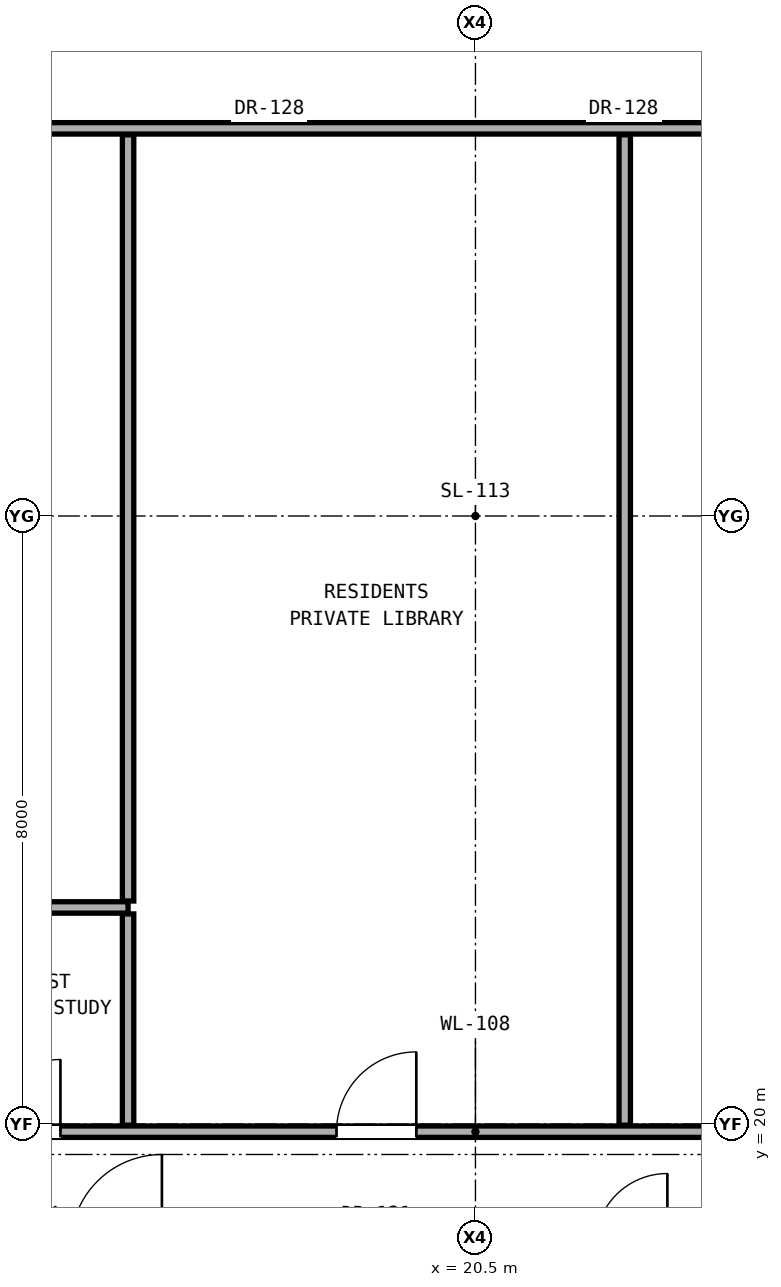
"""IFC4 building model, lengths in metres.
Left out: names, types, materials, properties, quantities, classifications, styles, units other than length and angle.
Written with IfcOpenShell. Run it as: python <this file> out.ifc"""

import sys

from ifc_helpers import new_model, si_unit, direction, frame, frame_2d, origin, place, context, subcontext, project, spatial, rectangle, extrude, element, fill, save


model = new_model("IFC4")
c1 = context("Model", 3, precision=1e-05, world=origin(), true_north=direction((0.0, 1.0)))
c2 = subcontext(c1, "Body", "Model", "MODEL_VIEW")
j1 = project(units=[si_unit("LENGTHUNIT", "METRE"), si_unit("PLANEANGLEUNIT", "RADIAN")], contexts=[c1])
p1 = place(None, origin())
s1 = spatial("IfcSite", under=j1, at=p1, CompositionType="ELEMENT")
p2 = place(p1, origin())
s2 = spatial("IfcBuilding", under=s1, at=p2, CompositionType="ELEMENT")
p3 = place(p2, frame((0.0, 0.0, 219.4)))
s3 = spatial("IfcBuildingStorey", under=s2, at=p3, CompositionType="ELEMENT", Elevation=219.4)
p4 = place(p3, frame((10.22, 19.9, 0.0), z_axis=(0.0, 0.0, 1.0), x_axis=(1.0, 0.0, 0.0)))
e1 = element("IfcWall", 1, at=p4, inside=s3, PredefinedType="PARTITIONING", context=c2, shape_type="SweptSolid", body=[
    extrude(rectangle(XDim=20.56, YDim=0.15, at=frame_2d((10.28, 0.0))), origin(), (0.0, 0.0, 1.0), 2.236),
])
p5 = place(p4, frame((1.36, 0.0, 0.0)))
e2 = element("IfcOpeningElement", 2, at=p5, cuts=e1, PredefinedType="OPENING", context=c2, shape_type="SweptSolid", body=[
    extrude(rectangle(XDim=0.9, YDim=2.1, at=frame_2d((0.45, 1.05))), frame((0.0, 0.085, 0.0), z_axis=(0.0, -1.0, 0.0), x_axis=(1.0, 0.0, 0.0)), (0.0, 0.0, 1.0), 0.17),
])
p6 = place(p4, frame((3.87, 0.0, 0.0)))
e3 = element("IfcOpeningElement", 3, at=p6, cuts=e1, PredefinedType="OPENING", context=c2, shape_type="SweptSolid", body=[
    extrude(rectangle(XDim=0.95, YDim=2.15, at=frame_2d((0.475, 1.075))), frame((0.0, 0.085, 0.0), z_axis=(0.0, -1.0, 0.0), x_axis=(1.0, 0.0, 0.0)), (0.0, 0.0, 1.0), 0.17),
])
p7 = place(p4, frame((8.452, 0.0, 0.0)))
e4 = element("IfcOpeningElement", 4, at=p7, cuts=e1, PredefinedType="OPENING", context=c2, shape_type="SweptSolid", body=[
    extrude(rectangle(XDim=1.05, YDim=2.2, at=frame_2d((0.525, 1.1))), frame((0.0, 0.085, 0.0), z_axis=(0.0, -1.0, 0.0), x_axis=(1.0, 0.0, 0.0)), (0.0, 0.0, 1.0), 0.17),
])
p8 = place(p3, frame((10.22, 22.85, 0.0), z_axis=(0.0, 0.0, 1.0), x_axis=(1.0, 0.0, 0.0)))
e5 = element("IfcWall", 5, at=p8, inside=s3, PredefinedType="PARTITIONING", context=c2, shape_type="SweptSolid", body=[
    extrude(rectangle(XDim=5.71, YDim=0.15, at=frame_2d((2.855, 0.0))), origin(), (0.0, 0.0, 1.0), 2.236),
])
p9 = place(p3, frame((10.22, 33.1, 0.0), z_axis=(0.0, 0.0, 1.0), x_axis=(1.0, 0.0, 0.0)))
e6 = element("IfcWall", 6, at=p9, inside=s3, PredefinedType="PARTITIONING", context=c2, shape_type="SweptSolid", body=[
    extrude(rectangle(XDim=20.56, YDim=0.15, at=frame_2d((10.28, 0.0))), origin(), (0.0, 0.0, 1.0), 2.236),
])
p10 = place(p9, frame((15.857, 0.0, 0.0)))
e7 = element("IfcOpeningElement", 7, at=p10, cuts=e6, PredefinedType="OPENING", context=c2, shape_type="SweptSolid", body=[
    extrude(rectangle(XDim=1.05, YDim=2.2, at=frame_2d((0.525, 1.1))), frame((0.0, 0.085, 0.0), z_axis=(0.0, -1.0, 0.0), x_axis=(1.0, 0.0, 0.0)), (0.0, 0.0, 1.0), 0.17),
])
p11 = place(p3, frame((15.93, 19.985, 0.0), z_axis=(0.0, 0.0, 1.0), x_axis=(0.0, 1.0, 0.0)))
e8 = element("IfcWall", 8, at=p11, inside=s3, PredefinedType="PARTITIONING", context=c2, shape_type="SweptSolid", body=[
    extrude(rectangle(XDim=2.78, YDim=0.15, at=frame_2d((1.39, 0.0))), origin(), (0.0, 0.0, 1.0), 3.1),
])
p12 = place(p3, frame((15.93, 22.935, 0.0), z_axis=(0.0, 0.0, 1.0), x_axis=(0.0, 1.0, 0.0)))
e9 = element("IfcWall", 9, at=p12, inside=s3, PredefinedType="PARTITIONING", context=c2, shape_type="SweptSolid", body=[
    extrude(rectangle(XDim=10.08, YDim=0.15, at=frame_2d((5.04, 0.0))), origin(), (0.0, 0.0, 1.0), 2.236),
])
p13 = place(p3, frame((22.464, 19.985, 0.0), z_axis=(0.0, 0.0, 1.0), x_axis=(0.0, 1.0, 0.0)))
e10 = element("IfcWall", 10, at=p13, inside=s3, PredefinedType="PARTITIONING", context=c2, shape_type="SweptSolid", body=[
    extrude(rectangle(XDim=13.03, YDim=0.15, at=frame_2d((6.515, 0.0))), origin(), (0.0, 0.0, 1.0), 2.236),
])
p14 = place(p6, origin())
e11 = element("IfcDoor", 11, at=p14, inside=s3, OperationType="SINGLE_SWING_RIGHT", PredefinedType="DOOR", context=c2, shape_type="SweptSolid", body=[
    extrude(rectangle(XDim=0.95, YDim=2.15, at=frame_2d((0.475, 1.075))), frame((0.0, 0.025, 0.0), z_axis=(0.0, -1.0, 0.0), x_axis=(1.0, 0.0, 0.0)), (0.0, 0.0, 1.0), 0.05),
])
fill(e3, e11)
p15 = place(p7, origin())
e12 = element("IfcDoor", 12, at=p15, inside=s3, OperationType="SINGLE_SWING_RIGHT", PredefinedType="DOOR", context=c2, shape_type="SweptSolid", body=[
    extrude(rectangle(XDim=1.05, YDim=2.2, at=frame_2d((0.525, 1.1))), frame((0.0, 0.025, 0.0), z_axis=(0.0, -1.0, 0.0), x_axis=(1.0, 0.0, 0.0)), (0.0, 0.0, 1.0), 0.05),
])
fill(e4, e12)
save(model, sys.argv[1])
